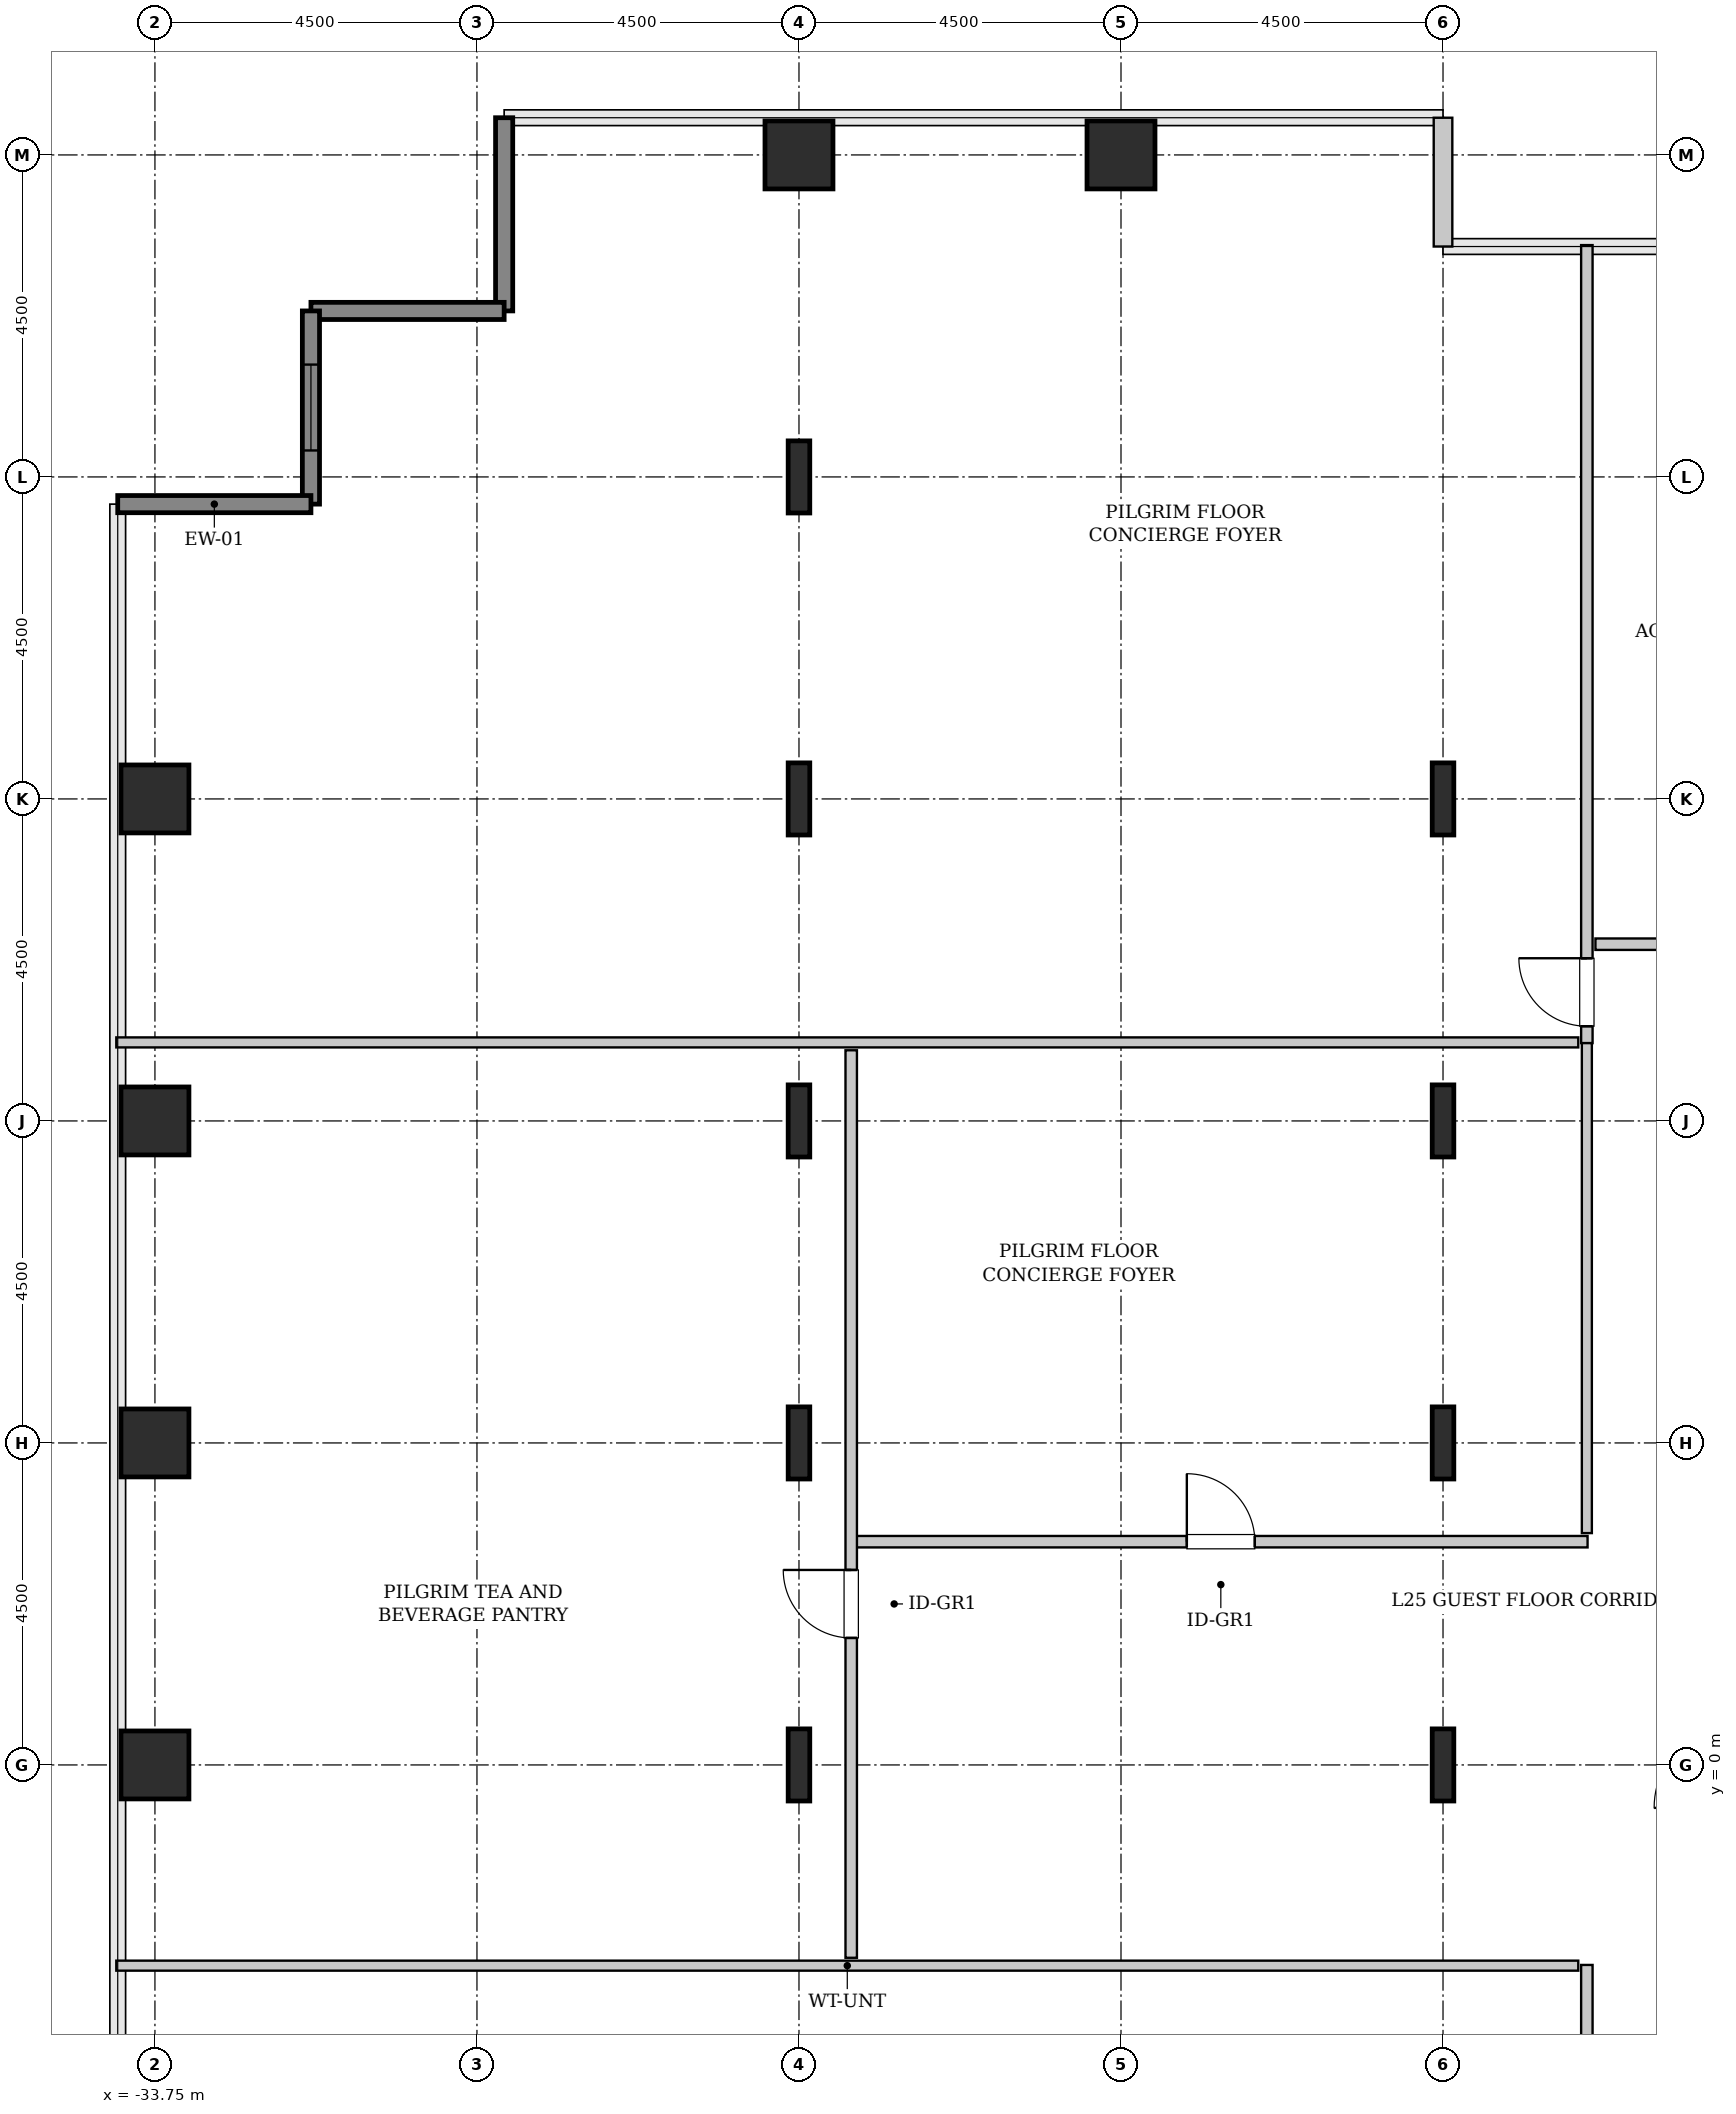
"""IFC4 building model, lengths in metres.
Left out: names, types, materials, properties, quantities, classifications, styles, units other than length and angle.
Written with IfcOpenShell. Run it as: python <this file> out.ifc"""

import sys

from ifc_helpers import new_model, si_unit, direction, frame, frame_2d, origin, origin_2d, place, context, subcontext, project, spatial, rectangle, hollow_rectangle, i_section, extrude, source, transform, mapped, element, fill, save


model = new_model("IFC4")
c1 = context("Model", 3, precision=1e-05, world=origin(), true_north=direction((0.0, 1.0)))
c2 = subcontext(c1, "Body", "Model", "MODEL_VIEW")
j1 = project(units=[si_unit("LENGTHUNIT", "METRE"), si_unit("PLANEANGLEUNIT", "RADIAN")], contexts=[c1])
p1 = place(None, origin())
s1 = spatial("IfcSite", under=j1, at=p1, CompositionType="ELEMENT")
p2 = place(p1, origin())
s2 = spatial("IfcBuilding", under=s1, at=p2, CompositionType="ELEMENT")
p3 = place(p2, frame((0.0, 0.0, 106.0)))
s3 = spatial("IfcBuildingStorey", under=s2, at=p3, CompositionType="ELEMENT", Elevation=106.0)
m1 = source(origin(), c2, "Body", "SweptSolid", [
    extrude(hollow_rectangle(XDim=0.95, YDim=0.95, WallThickness=0.045, InnerFilletRadius=0.045, OuterFilletRadius=0.09, at=origin_2d()), origin(), (0.0, 0.0, 1.0), 3.8),
])
for number, where, z_axis, x_axis in (
    (1, (-33.75, 0.0, 0.0), (0.0, 0.0, 1.0), (1.0, 0.0, 0.0)),
    (2, (-33.75, 4.5, 0.0), (0.0, 0.0, 1.0), (1.0, 0.0, 0.0)),
    (3, (-33.75, 9.0, 0.0), (0.0, 0.0, 1.0), (1.0, 0.0, 0.0)),
    (4, (-33.75, 13.5, 0.0), (0.0, 0.0, 1.0), (1.0, 0.0, 0.0)),
):
    element("IfcColumn", number, at=place(p3, frame(where, z_axis=z_axis, x_axis=x_axis)), inside=s3, PredefinedType="COLUMN", context=c2, shape_type="MappedRepresentation", body=[
        mapped(m1, transform((0.0, 0.0, 0.0), x_axis=(1.0, 0.0, 0.0), y_axis=(0.0, 1.0, 0.0), z_axis=(0.0, 0.0, 1.0), scale=1.0)),
    ])
m2 = source(origin(), c2, "Body", "SweptSolid", [
    extrude(i_section(OverallWidth=0.302, OverallDepth=1.008, WebThickness=0.021, FlangeThickness=0.04, FilletRadius=0.03, at=origin_2d()), origin(), (0.0, 0.0, 1.0), 3.8),
])
for number, where, z_axis, x_axis in (
    (5, (-24.75, 0.0, 0.0), (0.0, 0.0, 1.0), (1.0, 0.0, 0.0)),
    (6, (-24.75, 4.5, 0.0), (0.0, 0.0, 1.0), (1.0, 0.0, 0.0)),
    (7, (-24.75, 9.0, 0.0), (0.0, 0.0, 1.0), (1.0, 0.0, 0.0)),
    (8, (-24.75, 13.5, 0.0), (0.0, 0.0, 1.0), (1.0, 0.0, 0.0)),
    (9, (-24.75, 18.0, 0.0), (0.0, 0.0, 1.0), (1.0, 0.0, 0.0)),
):
    element("IfcColumn", number, at=place(p3, frame(where, z_axis=z_axis, x_axis=x_axis)), inside=s3, PredefinedType="COLUMN", context=c2, shape_type="MappedRepresentation", body=[
        mapped(m2, transform((0.0, 0.0, 0.0), x_axis=(1.0, 0.0, 0.0), y_axis=(0.0, 1.0, 0.0), z_axis=(0.0, 0.0, 1.0), scale=1.0)),
    ])
for number, where, z_axis, x_axis in (
    (10, (-24.75, 22.5, 0.0), (0.0, 0.0, 1.0), (1.0, 0.0, 0.0)),
    (11, (-20.25, 22.5, 0.0), (0.0, 0.0, 1.0), (1.0, 0.0, 0.0)),
):
    element("IfcColumn", number, at=place(p3, frame(where, z_axis=z_axis, x_axis=x_axis)), inside=s3, PredefinedType="COLUMN", context=c2, shape_type="MappedRepresentation", body=[
        mapped(m1, transform((0.0, 0.0, 0.0), x_axis=(1.0, 0.0, 0.0), y_axis=(0.0, 1.0, 0.0), z_axis=(0.0, 0.0, 1.0), scale=1.0)),
    ])
for number, where, z_axis, x_axis in (
    (12, (-15.75, 0.0, 0.0), (0.0, 0.0, 1.0), (1.0, 0.0, 0.0)),
    (13, (-15.75, 4.5, 0.0), (0.0, 0.0, 1.0), (1.0, 0.0, 0.0)),
    (14, (-15.75, 9.0, 0.0), (0.0, 0.0, 1.0), (1.0, 0.0, 0.0)),
    (15, (-15.75, 13.5, 0.0), (0.0, 0.0, 1.0), (1.0, 0.0, 0.0)),
):
    element("IfcColumn", number, at=place(p3, frame(where, z_axis=z_axis, x_axis=x_axis)), inside=s3, PredefinedType="COLUMN", context=c2, shape_type="MappedRepresentation", body=[
        mapped(m2, transform((0.0, 0.0, 0.0), x_axis=(1.0, 0.0, 0.0), y_axis=(0.0, 1.0, 0.0), z_axis=(0.0, 0.0, 1.0), scale=1.0)),
    ])
m3 = source(origin(), c2, "Body", "SweptSolid", [
    extrude(rectangle(XDim=1.8, YDim=0.26, at=frame_2d((0.9, 0.0))), origin(), (0.0, 0.0, 1.0), 3.55),
])
p4 = place(p3, frame((-15.75, 21.22, 0.0), z_axis=(0.0, 0.0, 1.0), x_axis=(0.0, 1.0, 0.0)))
e16 = element("IfcWall", 16, at=p4, inside=s3, PredefinedType="SOLIDWALL", context=c2, shape_type="MappedRepresentation", body=[
    mapped(m3, transform((0.0, 0.0, 0.0), x_axis=(1.0, 0.0, 0.0), y_axis=(0.0, 1.0, 0.0), z_axis=(0.0, 0.0, 1.0), scale=1.0)),
])
m4 = source(origin(), c2, "Body", "SweptSolid", [
    extrude(rectangle(XDim=2.7, YDim=0.24, at=frame_2d((1.35, 0.0))), origin(), (0.0, 0.0, 1.0), 3.55),
])
for number, where, z_axis, x_axis in (
    (17, (-28.87, 23.02, 0.0), (0.0, 0.0, 1.0), (0.0, -1.0, 0.0)),
    (18, (-28.87, 20.32, 0.0), (0.0, 0.0, 1.0), (-1.0, 0.0, 0.0)),
):
    element("IfcWall", number, at=place(p3, frame(where, z_axis=z_axis, x_axis=x_axis)), inside=s3, PredefinedType="SHEAR", context=c2, shape_type="MappedRepresentation", body=[
        mapped(m4, transform((0.0, 0.0, 0.0), x_axis=(1.0, 0.0, 0.0), y_axis=(0.0, 1.0, 0.0), z_axis=(0.0, 0.0, 1.0), scale=1.0)),
    ])
p5 = place(p3, frame((-31.57, 20.32, 0.0), z_axis=(0.0, 0.0, 1.0), x_axis=(0.0, -1.0, 0.0)))
e19 = element("IfcWall", 19, at=p5, inside=s3, PredefinedType="SHEAR", context=c2, shape_type="MappedRepresentation", body=[
    mapped(m4, transform((0.0, 0.0, 0.0), x_axis=(1.0, 0.0, 0.0), y_axis=(0.0, 1.0, 0.0), z_axis=(0.0, 0.0, 1.0), scale=1.0)),
])
p6 = place(p5, frame((0.75, 0.0, 0.85)))
e20 = element("IfcOpeningElement", 20, at=p6, cuts=e19, PredefinedType="OPENING", context=c2, shape_type="SweptSolid", body=[
    extrude(rectangle(XDim=1.2, YDim=1.8, at=frame_2d((0.6, 0.9))), frame((0.0, 0.13, 0.0), z_axis=(0.0, -1.0, 0.0), x_axis=(1.0, 0.0, 0.0)), (0.0, 0.0, 1.0), 0.26),
])
p7 = place(p3, frame((-31.57, 17.62, 0.0), z_axis=(0.0, 0.0, 1.0), x_axis=(-1.0, 0.0, 0.0)))
e21 = element("IfcWall", 21, at=p7, inside=s3, PredefinedType="SHEAR", context=c2, shape_type="MappedRepresentation", body=[
    mapped(m4, transform((0.0, 0.0, 0.0), x_axis=(1.0, 0.0, 0.0), y_axis=(0.0, 1.0, 0.0), z_axis=(0.0, 0.0, 1.0), scale=1.0)),
])
m5 = source(origin(), c2, "Body", "SweptSolid", [
    extrude(rectangle(XDim=18.445, YDim=0.16, at=frame_2d((9.223, 0.0))), origin(), (0.0, 0.0, 1.0), 3.535),
])
p8 = place(p3, frame((-13.74, -21.24, 0.0), z_axis=(0.0, 0.0, 1.0), x_axis=(0.0, 1.0, 0.0)))
e22 = element("IfcWall", 22, at=p8, inside=s3, PredefinedType="PARTITIONING", context=c2, shape_type="MappedRepresentation", body=[
    mapped(m5, transform((0.0, 0.0, 0.0), x_axis=(1.0, 0.0, 0.0), y_axis=(0.0, 1.0, 0.0), z_axis=(0.0, 0.0, 1.0), scale=1.0)),
])
p9 = place(p8, frame((13.613, 0.0, 0.0)))
e23 = element("IfcOpeningElement", 23, at=p9, cuts=e22, PredefinedType="OPENING", context=c2, shape_type="SweptSolid", body=[
    extrude(rectangle(XDim=0.95, YDim=2.1, at=frame_2d((0.475, 1.05))), frame((0.0, 0.09, 0.0), z_axis=(0.0, -1.0, 0.0), x_axis=(1.0, 0.0, 0.0)), (0.0, 0.0, 1.0), 0.18),
])
m6 = source(origin(), c2, "Body", "SweptSolid", [
    extrude(rectangle(XDim=20.43, YDim=0.14, at=frame_2d((10.215, 0.0))), origin(), (0.0, 0.0, 1.0), 3.535),
])
p10 = place(p3, frame((-34.29, -2.805, 0.0), z_axis=(0.0, 0.0, 1.0), x_axis=(1.0, 0.0, 0.0)))
e24 = element("IfcWall", 24, at=p10, inside=s3, PredefinedType="PARTITIONING", context=c2, shape_type="MappedRepresentation", body=[
    mapped(m6, transform((0.0, 0.0, 0.0), x_axis=(1.0, 0.0, 0.0), y_axis=(0.0, 1.0, 0.0), z_axis=(0.0, 0.0, 1.0), scale=1.0)),
])
m7 = source(origin(), c2, "Body", "SweptSolid", [
    extrude(rectangle(XDim=11.153, YDim=0.16, at=frame_2d((5.576, 0.0))), origin(), (0.0, 0.0, 1.0), 3.535),
])
p11 = place(p3, frame((-13.74, 10.087, 0.0), z_axis=(0.0, 0.0, 1.0), x_axis=(0.0, 1.0, 0.0)))
e25 = element("IfcWall", 25, at=p11, inside=s3, PredefinedType="PARTITIONING", context=c2, shape_type="MappedRepresentation", body=[
    mapped(m7, transform((0.0, 0.0, 0.0), x_axis=(1.0, 0.0, 0.0), y_axis=(0.0, 1.0, 0.0), z_axis=(0.0, 0.0, 1.0), scale=1.0)),
])
p12 = place(p11, frame((0.236, 0.0, 0.0)))
e26 = element("IfcOpeningElement", 26, at=p12, cuts=e25, PredefinedType="OPENING", context=c2, shape_type="SweptSolid", body=[
    extrude(rectangle(XDim=0.95, YDim=2.1, at=frame_2d((0.475, 1.05))), frame((0.0, 0.09, 0.0), z_axis=(0.0, -1.0, 0.0), x_axis=(1.0, 0.0, 0.0)), (0.0, 0.0, 1.0), 0.18),
])
p13 = place(p3, frame((-34.29, 10.097, 0.0), z_axis=(0.0, 0.0, 1.0), x_axis=(1.0, 0.0, 0.0)))
e27 = element("IfcWall", 27, at=p13, inside=s3, PredefinedType="PARTITIONING", context=c2, shape_type="MappedRepresentation", body=[
    mapped(m6, transform((0.0, 0.0, 0.0), x_axis=(1.0, 0.0, 0.0), y_axis=(0.0, 1.0, 0.0), z_axis=(0.0, 0.0, 1.0), scale=1.0)),
])
m8 = source(origin(), c2, "Body", "SweptSolid", [
    extrude(rectangle(XDim=10.25, YDim=0.16, at=frame_2d((5.125, 0.0))), origin(), (0.0, 0.0, 1.0), 3.535),
])
p14 = place(p3, frame((-23.98, 3.12, 0.0), z_axis=(0.0, 0.0, 1.0), x_axis=(1.0, 0.0, 0.0)))
e28 = element("IfcWall", 28, at=p14, inside=s3, PredefinedType="PARTITIONING", context=c2, shape_type="MappedRepresentation", body=[
    mapped(m8, transform((0.0, 0.0, 0.0), x_axis=(1.0, 0.0, 0.0), y_axis=(0.0, 1.0, 0.0), z_axis=(0.0, 0.0, 1.0), scale=1.0)),
])
p15 = place(p14, frame((4.65, 0.0, 0.0)))
e29 = element("IfcOpeningElement", 29, at=p15, cuts=e28, PredefinedType="OPENING", context=c2, shape_type="SweptSolid", body=[
    extrude(rectangle(XDim=0.95, YDim=2.1, at=frame_2d((0.475, 1.05))), frame((0.0, 0.09, 0.0), z_axis=(0.0, -1.0, 0.0), x_axis=(1.0, 0.0, 0.0)), (0.0, 0.0, 1.0), 0.18),
])
m9 = source(origin(), c2, "Body", "SweptSolid", [
    extrude(rectangle(XDim=6.847, YDim=0.14, at=frame_2d((3.424, 0.0))), origin(), (0.0, 0.0, 1.0), 3.535),
])
p16 = place(p3, frame((-13.74, 3.24, 0.0), z_axis=(0.0, 0.0, 1.0), x_axis=(0.0, 1.0, 0.0)))
e30 = element("IfcWall", 30, at=p16, inside=s3, PredefinedType="PARTITIONING", context=c2, shape_type="MappedRepresentation", body=[
    mapped(m9, transform((0.0, 0.0, 0.0), x_axis=(1.0, 0.0, 0.0), y_axis=(0.0, 1.0, 0.0), z_axis=(0.0, 0.0, 1.0), scale=1.0)),
])
m10 = source(origin(), c2, "Body", "SweptSolid", [
    extrude(rectangle(XDim=12.683, YDim=0.16, at=frame_2d((6.341, 0.0))), origin(), (0.0, 0.0, 1.0), 3.535),
])
p17 = place(p3, frame((-24.02, -2.695, 0.0), z_axis=(0.0, 0.0, 1.0), x_axis=(0.0, 1.0, 0.0)))
e31 = element("IfcWall", 31, at=p17, inside=s3, PredefinedType="PARTITIONING", context=c2, shape_type="MappedRepresentation", body=[
    mapped(m10, transform((0.0, 0.0, 0.0), x_axis=(1.0, 0.0, 0.0), y_axis=(0.0, 1.0, 0.0), z_axis=(0.0, 0.0, 1.0), scale=1.0)),
])
p18 = place(p17, frame((4.47, 0.0, 0.0)))
e32 = element("IfcOpeningElement", 32, at=p18, cuts=e31, PredefinedType="OPENING", context=c2, shape_type="SweptSolid", body=[
    extrude(rectangle(XDim=0.95, YDim=2.1, at=frame_2d((0.475, 1.05))), frame((0.0, 0.09, 0.0), z_axis=(0.0, -1.0, 0.0), x_axis=(1.0, 0.0, 0.0)), (0.0, 0.0, 1.0), 0.18),
])
m11 = source(origin(), c2, "Body", "SweptSolid", [
    extrude(rectangle(XDim=4.125, YDim=0.16, at=frame_2d((2.062, 0.0))), origin(), (0.0, 0.0, 1.0), 3.535),
])
p19 = place(p3, frame((-13.62, 11.47, 0.0), z_axis=(0.0, 0.0, 1.0), x_axis=(1.0, 0.0, 0.0)))
e33 = element("IfcWall", 33, at=p19, inside=s3, PredefinedType="PARTITIONING", context=c2, shape_type="MappedRepresentation", body=[
    mapped(m11, transform((0.0, 0.0, 0.0), x_axis=(1.0, 0.0, 0.0), y_axis=(0.0, 1.0, 0.0), z_axis=(0.0, 0.0, 1.0), scale=1.0)),
])
p20 = place(p19, frame((1.587, 0.0, 0.0)))
e34 = element("IfcOpeningElement", 34, at=p20, cuts=e33, PredefinedType="OPENING", context=c2, shape_type="SweptSolid", body=[
    extrude(rectangle(XDim=0.95, YDim=2.1, at=frame_2d((0.475, 1.05))), frame((0.0, 0.09, 0.0), z_axis=(0.0, -1.0, 0.0), x_axis=(1.0, 0.0, 0.0)), (0.0, 0.0, 1.0), 0.18),
])
m12 = source(origin(), c2, "Body", "SweptSolid", [
    extrude(rectangle(XDim=1.2, YDim=1.8, at=frame_2d((0.6, 0.9))), frame((0.0, 0.03, 0.0), z_axis=(0.0, -1.0, 0.0), x_axis=(1.0, 0.0, 0.0)), (0.0, 0.0, 1.0), 0.06),
])
p21 = place(p6, origin())
e35 = element("IfcWindow", 35, at=p21, inside=s3, PartitioningType="SINGLE_PANEL", PredefinedType="WINDOW", context=c2, shape_type="MappedRepresentation", body=[
    mapped(m12, transform((0.0, 0.0, 0.0), x_axis=(1.0, 0.0, 0.0), y_axis=(0.0, 1.0, 0.0), z_axis=(0.0, 0.0, 1.0), scale=1.0)),
])
fill(e20, e35)
m13 = source(origin(), c2, "Body", "SweptSolid", [
    extrude(rectangle(XDim=0.95, YDim=2.1, at=frame_2d((0.475, 1.05))), frame((0.0, 0.025, 0.0), z_axis=(0.0, -1.0, 0.0), x_axis=(1.0, 0.0, 0.0)), (0.0, 0.0, 1.0), 0.05),
])
p22 = place(p12, origin())
e36 = element("IfcDoor", 36, at=p22, inside=s3, OperationType="SINGLE_SWING_RIGHT", PredefinedType="DOOR", context=c2, shape_type="MappedRepresentation", body=[
    mapped(m13, transform((0.0, 0.0, 0.0), x_axis=(1.0, 0.0, 0.0), y_axis=(0.0, 1.0, 0.0), z_axis=(0.0, 0.0, 1.0), scale=1.0)),
])
fill(e26, e36)
p23 = place(p15, origin())
e37 = element("IfcDoor", 37, at=p23, inside=s3, OperationType="SINGLE_SWING_LEFT", PredefinedType="DOOR", context=c2, shape_type="MappedRepresentation", body=[
    mapped(m13, transform((0.0, 0.0, 0.0), x_axis=(1.0, 0.0, 0.0), y_axis=(0.0, 1.0, 0.0), z_axis=(0.0, 0.0, 1.0), scale=1.0)),
])
fill(e29, e37)
p24 = place(p18, origin())
e38 = element("IfcDoor", 38, at=p24, inside=s3, OperationType="SINGLE_SWING_RIGHT", PredefinedType="DOOR", context=c2, shape_type="MappedRepresentation", body=[
    mapped(m13, transform((0.0, 0.0, 0.0), x_axis=(1.0, 0.0, 0.0), y_axis=(0.0, 1.0, 0.0), z_axis=(0.0, 0.0, 1.0), scale=1.0)),
])
fill(e32, e38)
save(model, sys.argv[1])
